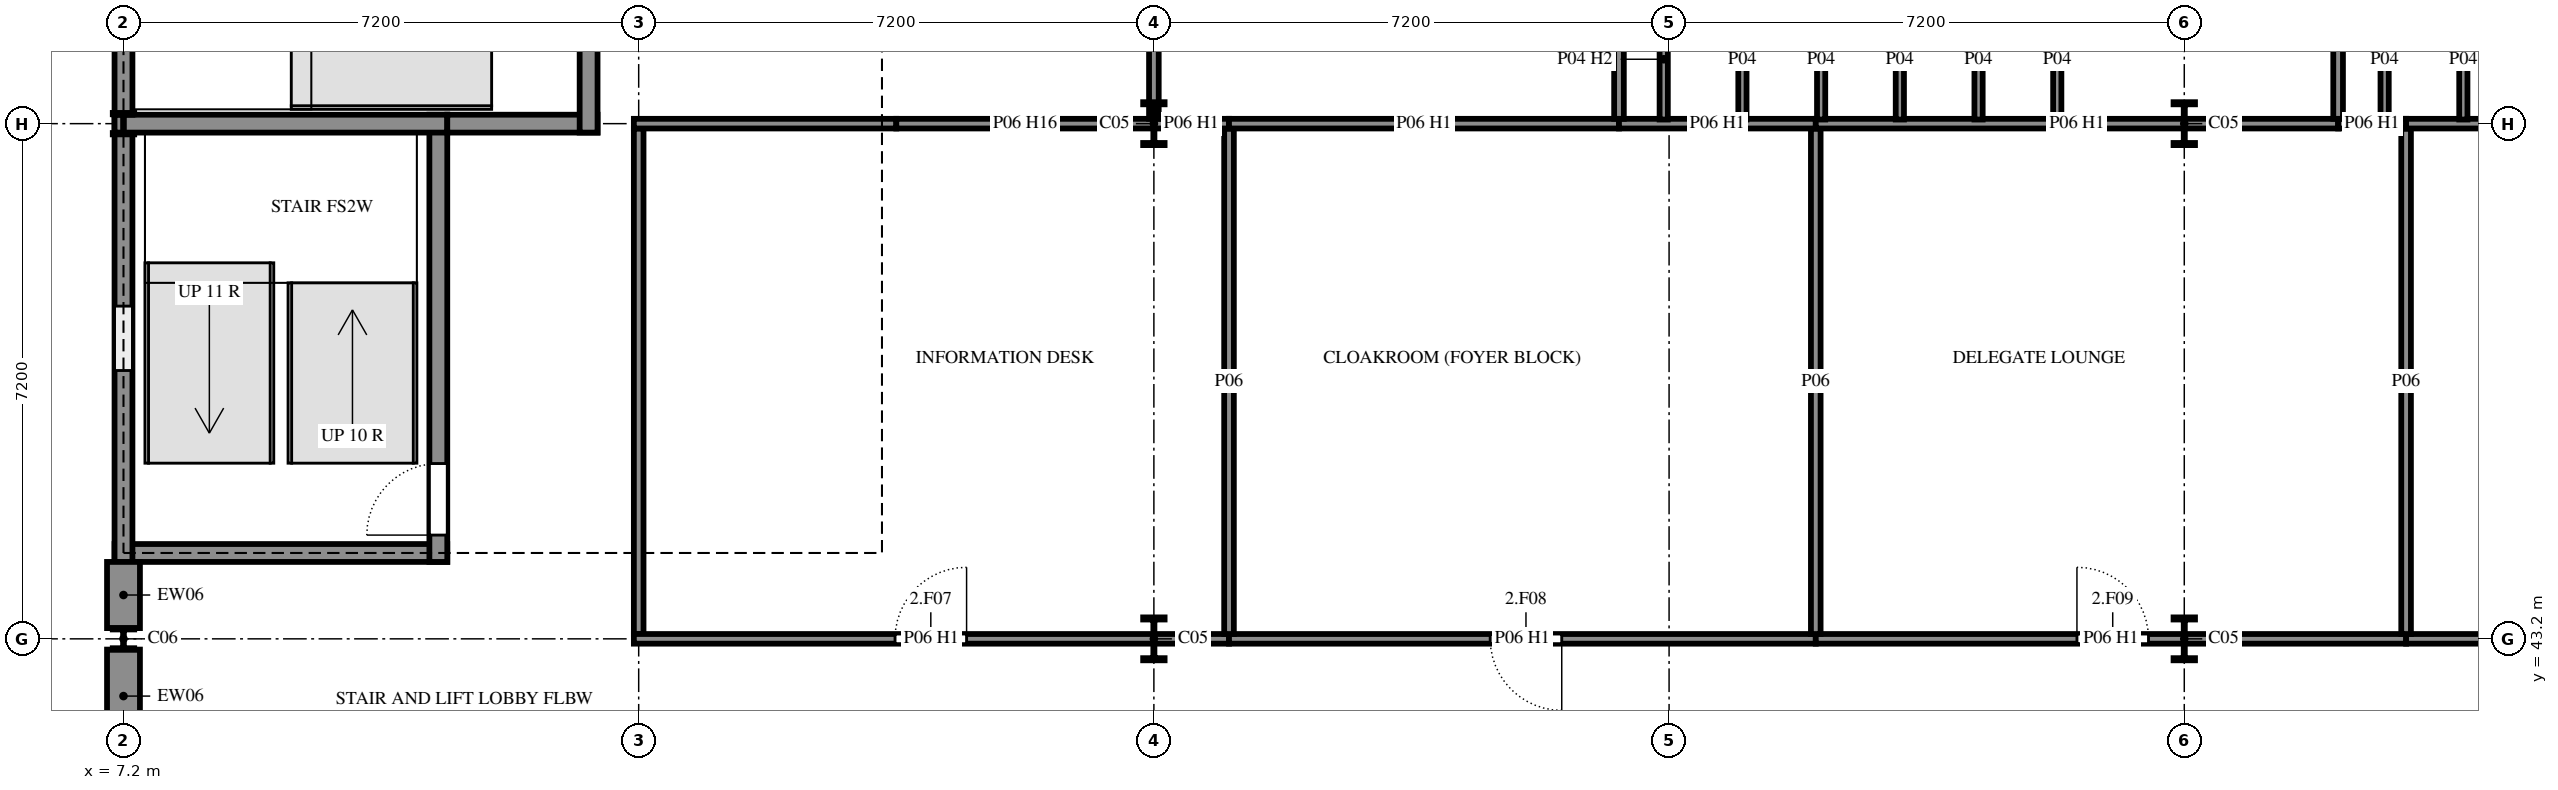
"""IFC4 building model, lengths in metres.
Left out: names, types, materials, properties, quantities, classifications, styles, units other than length and angle.
Written with IfcOpenShell. Run it as: python <this file> out.ifc"""

import sys

from ifc_helpers import new_model, si_unit, direction, frame, frame_2d, origin, origin_2d, place, context, subcontext, project, spatial, rectangle, i_section, extrude, element, fill, save


model = new_model("IFC4")
c1 = context("Model", 3, precision=1e-05, world=origin(), true_north=direction((0.0, 1.0)))
c2 = subcontext(c1, "Body", "Model", "MODEL_VIEW")
j1 = project(units=[si_unit("LENGTHUNIT", "METRE"), si_unit("PLANEANGLEUNIT", "RADIAN")], contexts=[c1])
p1 = place(None, origin())
s1 = spatial("IfcSite", under=j1, at=p1, CompositionType="ELEMENT")
p2 = place(p1, origin())
s2 = spatial("IfcBuilding", under=s1, at=p2, CompositionType="ELEMENT")
p3 = place(p2, frame((0.0, 0.0, 7.2)))
s3 = spatial("IfcBuildingStorey", under=s2, at=p3, CompositionType="ELEMENT", Elevation=7.2)
for number, where, z_axis, x_axis in (
    (1, (7.2, 43.2, 0.0), (0.0, 0.0, 1.0), (1.0, 0.0, 0.0)),
    (2, (7.2, 50.4, 0.0), (0.0, 0.0, 1.0), (1.0, 0.0, 0.0)),
):
    element("IfcColumn", number, at=place(p3, frame(where, z_axis=z_axis, x_axis=x_axis)), inside=s3, PredefinedType="COLUMN", context=c2, shape_type="SweptSolid", body=[
        extrude(i_section(OverallWidth=0.3, OverallDepth=0.3, WebThickness=0.011, FlangeThickness=0.019, FilletRadius=0.027, at=origin_2d()), origin(), (0.0, 0.0, 1.0), 3.6),
    ])
for number, where, z_axis, x_axis in (
    (3, (21.6, 43.2, 0.0), (0.0, 0.0, 1.0), (1.0, 0.0, 0.0)),
    (4, (21.6, 50.4, 0.0), (0.0, 0.0, 1.0), (1.0, 0.0, 0.0)),
    (5, (36.0, 43.2, 0.0), (0.0, 0.0, 1.0), (1.0, 0.0, 0.0)),
    (6, (36.0, 50.4, 0.0), (0.0, 0.0, 1.0), (1.0, 0.0, 0.0)),
):
    element("IfcColumn", number, at=place(p3, frame(where, z_axis=z_axis, x_axis=x_axis)), inside=s3, PredefinedType="COLUMN", context=c2, shape_type="SweptSolid", body=[
        extrude(i_section(OverallWidth=0.3, OverallDepth=0.6, WebThickness=0.015, FlangeThickness=0.03, FilletRadius=0.027, at=origin_2d()), origin(), (0.0, 0.0, 1.0), 3.6),
    ])
p4 = place(p3, frame((7.075, 44.4, 0.0), z_axis=(0.0, 0.0, 1.0), x_axis=(1.0, 0.0, 0.0)))
e7 = element("IfcWall", 7, at=p4, inside=s3, PredefinedType="SHEAR", context=c2, shape_type="SweptSolid", body=[
    extrude(rectangle(XDim=4.65, YDim=0.25, at=frame_2d((2.325, 0.0))), origin(), (0.0, 0.0, 1.0), 3.6),
])
p5 = place(p3, frame((11.6, 44.275, 0.0), z_axis=(0.0, 0.0, 1.0), x_axis=(0.0, 1.0, 0.0)))
e8 = element("IfcWall", 8, at=p5, inside=s3, PredefinedType="SHEAR", context=c2, shape_type="SweptSolid", body=[
    extrude(rectangle(XDim=6.25, YDim=0.25, at=frame_2d((3.125, 0.0))), origin(), (0.0, 0.0, 1.0), 3.6),
])
p6 = place(p5, frame((0.375, 0.0, 0.0)))
e9 = element("IfcOpeningElement", 9, at=p6, cuts=e8, PredefinedType="OPENING", context=c2, shape_type="SweptSolid", body=[
    extrude(rectangle(XDim=1.0, YDim=2.4, at=frame_2d((0.5, 1.2))), frame((0.0, 0.135, 0.0), z_axis=(0.0, -1.0, 0.0), x_axis=(1.0, 0.0, 0.0)), (0.0, 0.0, 1.0), 0.27),
])
p7 = place(p3, frame((7.2, 50.525, 0.0), z_axis=(0.0, 0.0, 1.0), x_axis=(0.0, -1.0, 0.0)))
e10 = element("IfcWall", 10, at=p7, inside=s3, PredefinedType="SHEAR", context=c2, shape_type="SweptSolid", body=[
    extrude(rectangle(XDim=6.25, YDim=0.25, at=frame_2d((3.125, 0.0))), origin(), (0.0, 0.0, 1.0), 3.6),
])
p8 = place(p7, frame((2.675, 0.0, 0.6)))
e11 = element("IfcOpeningElement", 11, at=p8, cuts=e10, PredefinedType="OPENING", context=c2, shape_type="SweptSolid", body=[
    extrude(rectangle(XDim=0.9, YDim=2.1, at=frame_2d((0.45, 1.05))), frame((0.0, 0.135, 0.0), z_axis=(0.0, -1.0, 0.0), x_axis=(1.0, 0.0, 0.0)), (0.0, 0.0, 1.0), 0.27),
])
p9 = place(p3, frame((11.725, 50.4, 0.0), z_axis=(0.0, 0.0, 1.0), x_axis=(-1.0, 0.0, 0.0)))
e12 = element("IfcWall", 12, at=p9, inside=s3, PredefinedType="SHEAR", context=c2, shape_type="SweptSolid", body=[
    extrude(rectangle(XDim=4.65, YDim=0.25, at=frame_2d((2.325, 0.0))), origin(), (0.0, 0.0, 1.0), 3.6),
])
p10 = place(p3, frame((11.725, 50.4, 0.0), z_axis=(0.0, 0.0, 1.0), x_axis=(1.0, 0.0, 0.0)))
e13 = element("IfcWall", 13, at=p10, inside=s3, PredefinedType="SHEAR", context=c2, shape_type="SweptSolid", body=[
    extrude(rectangle(XDim=2.1, YDim=0.25, at=frame_2d((1.05, 0.0))), origin(), (0.0, 0.0, 1.0), 3.6),
])
p11 = place(p3, frame((13.7, 50.275, 0.0), z_axis=(0.0, 0.0, 1.0), x_axis=(0.0, 1.0, 0.0)))
e14 = element("IfcWall", 14, at=p11, inside=s3, PredefinedType="SHEAR", context=c2, shape_type="SweptSolid", body=[
    extrude(rectangle(XDim=5.25, YDim=0.25, at=frame_2d((2.625, 0.0))), origin(), (0.0, 0.0, 1.0), 3.6),
])
p12 = place(p11, frame((1.975, 0.0, 0.0)))
e15 = element("IfcOpeningElement", 15, at=p12, cuts=e14, PredefinedType="OPENING", context=c2, shape_type="SweptSolid", body=[
    extrude(rectangle(XDim=1.2, YDim=2.4, at=frame_2d((0.6, 1.2))), frame((0.0, 0.135, 0.0), z_axis=(0.0, -1.0, 0.0), x_axis=(1.0, 0.0, 0.0)), (0.0, 0.0, 1.0), 0.27),
])
p13 = place(p3, frame((7.2, 55.525, 0.0), z_axis=(0.0, 0.0, 1.0), x_axis=(0.0, -1.0, 0.0)))
e16 = element("IfcWall", 16, at=p13, inside=s3, PredefinedType="SHEAR", context=c2, shape_type="SweptSolid", body=[
    extrude(rectangle(XDim=5.0, YDim=0.25, at=frame_2d((2.5, 0.0))), origin(), (0.0, 0.0, 1.0), 3.6),
])
p14 = place(p13, frame((2.175, 0.0, 0.6)))
e17 = element("IfcOpeningElement", 17, at=p14, cuts=e16, PredefinedType="OPENING", context=c2, shape_type="SweptSolid", body=[
    extrude(rectangle(XDim=0.9, YDim=2.1, at=frame_2d((0.45, 1.05))), frame((0.0, 0.135, 0.0), z_axis=(0.0, -1.0, 0.0), x_axis=(1.0, 0.0, 0.0)), (0.0, 0.0, 1.0), 0.27),
])
p15 = place(p3, frame((7.2, 44.275, 0.0), z_axis=(0.0, 0.0, 1.0), x_axis=(0.0, -1.0, 0.0)))
e18 = element("IfcWall", 18, at=p15, inside=s3, PredefinedType="SOLIDWALL", context=c2, shape_type="SweptSolid", body=[
    extrude(rectangle(XDim=0.925, YDim=0.46, at=frame_2d((0.462, 0.0))), origin(), (0.0, 0.0, 1.0), 3.22),
])
p16 = place(p3, frame((7.2, 43.05, 0.0), z_axis=(0.0, 0.0, 1.0), x_axis=(0.0, -1.0, 0.0)))
e19 = element("IfcWall", 19, at=p16, inside=s3, PredefinedType="SOLIDWALL", context=c2, shape_type="SweptSolid", body=[
    extrude(rectangle(XDim=1.3, YDim=0.46, at=frame_2d((0.65, 0.0))), origin(), (0.0, 0.0, 1.0), 3.22),
])
p17 = place(p3, frame((14.4, 50.333, 0.0), z_axis=(0.0, 0.0, 1.0), x_axis=(0.0, -1.0, 0.0)))
e20 = element("IfcWall", 20, at=p17, inside=s3, PredefinedType="PARTITIONING", context=c2, shape_type="SweptSolid", body=[
    extrude(rectangle(XDim=7.065, YDim=0.135, at=frame_2d((3.532, 0.0))), origin(), (0.0, 0.0, 1.0), 3.12),
])
p18 = place(p3, frame((18.0, 50.4, 0.0), z_axis=(0.0, 0.0, 1.0), x_axis=(-1.0, 0.0, 0.0)))
e21 = element("IfcWall", 21, at=p18, inside=s3, PredefinedType="PARTITIONING", context=c2, shape_type="SweptSolid", body=[
    extrude(rectangle(XDim=3.667, YDim=0.135, at=frame_2d((1.834, 0.0))), origin(), (0.0, 0.0, 1.0), 3.09),
])
p19 = place(p3, frame((14.333, 43.2, 0.0), z_axis=(0.0, 0.0, 1.0), x_axis=(1.0, 0.0, 0.0)))
e22 = element("IfcWall", 22, at=p19, inside=s3, PredefinedType="PARTITIONING", context=c2, shape_type="SweptSolid", body=[
    extrude(rectangle(XDim=8.317, YDim=0.135, at=frame_2d((4.159, 0.0))), origin(), (0.0, 0.0, 1.0), 2.82),
])
p20 = place(p19, frame((3.65, 0.0, 0.0)))
e23 = element("IfcOpeningElement", 23, at=p20, cuts=e22, PredefinedType="OPENING", context=c2, shape_type="SweptSolid", body=[
    extrude(rectangle(XDim=1.0, YDim=2.4, at=frame_2d((0.5, 1.2))), frame((0.0, 0.077, 0.0), z_axis=(0.0, -1.0, 0.0), x_axis=(1.0, 0.0, 0.0)), (0.0, 0.0, 1.0), 0.155),
])
p21 = place(p3, frame((22.65, 43.2, 0.0), z_axis=(0.0, 0.0, 1.0), x_axis=(1.0, 0.0, 0.0)))
e24 = element("IfcWall", 24, at=p21, inside=s3, PredefinedType="PARTITIONING", context=c2, shape_type="SweptSolid", body=[
    extrude(rectangle(XDim=8.2, YDim=0.135, at=frame_2d((4.1, 0.0))), origin(), (0.0, 0.0, 1.0), 2.82),
])
p22 = place(p21, frame((3.65, 0.0, 0.0)))
e25 = element("IfcOpeningElement", 25, at=p22, cuts=e24, PredefinedType="OPENING", context=c2, shape_type="SweptSolid", body=[
    extrude(rectangle(XDim=1.0, YDim=2.4, at=frame_2d((0.5, 1.2))), frame((0.0, 0.077, 0.0), z_axis=(0.0, -1.0, 0.0), x_axis=(1.0, 0.0, 0.0)), (0.0, 0.0, 1.0), 0.155),
])
p23 = place(p3, frame((30.85, 43.2, 0.0), z_axis=(0.0, 0.0, 1.0), x_axis=(1.0, 0.0, 0.0)))
e26 = element("IfcWall", 26, at=p23, inside=s3, PredefinedType="PARTITIONING", context=c2, shape_type="SweptSolid", body=[
    extrude(rectangle(XDim=8.25, YDim=0.135, at=frame_2d((4.125, 0.0))), origin(), (0.0, 0.0, 1.0), 2.82),
])
p24 = place(p23, frame((3.65, 0.0, 0.0)))
e27 = element("IfcOpeningElement", 27, at=p24, cuts=e26, PredefinedType="OPENING", context=c2, shape_type="SweptSolid", body=[
    extrude(rectangle(XDim=1.0, YDim=2.4, at=frame_2d((0.5, 1.2))), frame((0.0, 0.077, 0.0), z_axis=(0.0, -1.0, 0.0), x_axis=(1.0, 0.0, 0.0)), (0.0, 0.0, 1.0), 0.155),
])
p25 = place(p3, frame((39.1, 43.2, 0.0), z_axis=(0.0, 0.0, 1.0), x_axis=(1.0, 0.0, 0.0)))
e28 = element("IfcWall", 28, at=p25, inside=s3, PredefinedType="PARTITIONING", context=c2, shape_type="SweptSolid", body=[
    extrude(rectangle(XDim=8.2, YDim=0.135, at=frame_2d((4.1, 0.0))), origin(), (0.0, 0.0, 1.0), 2.82),
])
p26 = place(p25, frame((1.25, 0.0, 0.0)))
e29 = element("IfcOpeningElement", 29, at=p26, cuts=e28, PredefinedType="OPENING", context=c2, shape_type="SweptSolid", body=[
    extrude(rectangle(XDim=1.0, YDim=2.4, at=frame_2d((0.5, 1.2))), frame((0.0, 0.077, 0.0), z_axis=(0.0, -1.0, 0.0), x_axis=(1.0, 0.0, 0.0)), (0.0, 0.0, 1.0), 0.155),
])
p27 = place(p3, frame((22.65, 50.333, 0.0), z_axis=(0.0, 0.0, 1.0), x_axis=(0.0, -1.0, 0.0)))
e30 = element("IfcWall", 30, at=p27, inside=s3, PredefinedType="PARTITIONING", context=c2, shape_type="SweptSolid", body=[
    extrude(rectangle(XDim=7.065, YDim=0.135, at=frame_2d((3.532, 0.0))), origin(), (0.0, 0.0, 1.0), 3.42),
])
p28 = place(p3, frame((21.6, 50.4, 0.0), z_axis=(0.0, 0.0, 1.0), x_axis=(1.0, 0.0, 0.0)))
e31 = element("IfcWall", 31, at=p28, inside=s3, PredefinedType="PARTITIONING", context=c2, shape_type="SweptSolid", body=[
    extrude(rectangle(XDim=1.05, YDim=0.135, at=frame_2d((0.525, 0.0))), origin(), (0.0, 0.0, 1.0), 2.82),
])
p29 = place(p3, frame((18.0, 50.4, 0.0), z_axis=(0.0, 0.0, 1.0), x_axis=(1.0, 0.0, 0.0)))
e32 = element("IfcWall", 32, at=p29, inside=s3, PredefinedType="PARTITIONING", context=c2, shape_type="SweptSolid", body=[
    extrude(rectangle(XDim=3.6, YDim=0.135, at=frame_2d((1.8, 0.0))), origin(), (0.0, 0.0, 1.0), 3.09),
])
p30 = place(p3, frame((30.85, 50.333, 0.0), z_axis=(0.0, 0.0, 1.0), x_axis=(0.0, -1.0, 0.0)))
e33 = element("IfcWall", 33, at=p30, inside=s3, PredefinedType="PARTITIONING", context=c2, shape_type="SweptSolid", body=[
    extrude(rectangle(XDim=7.065, YDim=0.135, at=frame_2d((3.532, 0.0))), origin(), (0.0, 0.0, 1.0), 3.42),
])
p31 = place(p3, frame((22.65, 50.4, 0.0), z_axis=(0.0, 0.0, 1.0), x_axis=(1.0, 0.0, 0.0)))
e34 = element("IfcWall", 34, at=p31, inside=s3, PredefinedType="PARTITIONING", context=c2, shape_type="SweptSolid", body=[
    extrude(rectangle(XDim=5.45, YDim=0.135, at=frame_2d((2.725, 0.0))), origin(), (0.0, 0.0, 1.0), 2.82),
])
p32 = place(p3, frame((28.1, 50.4, 0.0), z_axis=(0.0, 0.0, 1.0), x_axis=(1.0, 0.0, 0.0)))
e35 = element("IfcWall", 35, at=p32, inside=s3, PredefinedType="PARTITIONING", context=c2, shape_type="SweptSolid", body=[
    extrude(rectangle(XDim=2.75, YDim=0.135, at=frame_2d((1.375, 0.0))), origin(), (0.0, 0.0, 1.0), 2.82),
])
p33 = place(p3, frame((39.1, 50.333, 0.0), z_axis=(0.0, 0.0, 1.0), x_axis=(0.0, -1.0, 0.0)))
e36 = element("IfcWall", 36, at=p33, inside=s3, PredefinedType="PARTITIONING", context=c2, shape_type="SweptSolid", body=[
    extrude(rectangle(XDim=7.065, YDim=0.135, at=frame_2d((3.532, 0.0))), origin(), (0.0, 0.0, 1.0), 3.42),
])
p34 = place(p3, frame((30.85, 50.4, 0.0), z_axis=(0.0, 0.0, 1.0), x_axis=(1.0, 0.0, 0.0)))
e37 = element("IfcWall", 37, at=p34, inside=s3, PredefinedType="PARTITIONING", context=c2, shape_type="SweptSolid", body=[
    extrude(rectangle(XDim=7.3, YDim=0.135, at=frame_2d((3.65, 0.0))), origin(), (0.0, 0.0, 1.0), 2.82),
])
p35 = place(p3, frame((38.15, 50.4, 0.0), z_axis=(0.0, 0.0, 1.0), x_axis=(1.0, 0.0, 0.0)))
e38 = element("IfcWall", 38, at=p35, inside=s3, PredefinedType="PARTITIONING", context=c2, shape_type="SweptSolid", body=[
    extrude(rectangle(XDim=0.95, YDim=0.135, at=frame_2d((0.475, 0.0))), origin(), (0.0, 0.0, 1.0), 2.82),
])
p36 = place(p3, frame((39.1, 50.4, 0.0), z_axis=(0.0, 0.0, 1.0), x_axis=(1.0, 0.0, 0.0)))
e39 = element("IfcWall", 39, at=p36, inside=s3, PredefinedType="PARTITIONING", context=c2, shape_type="SweptSolid", body=[
    extrude(rectangle(XDim=8.2, YDim=0.135, at=frame_2d((4.1, 0.0))), origin(), (0.0, 0.0, 1.0), 2.82),
])
p37 = place(p3, frame((28.1, 58.133, 0.0), z_axis=(0.0, 0.0, 1.0), x_axis=(0.0, -1.0, 0.0)))
e40 = element("IfcWall", 40, at=p37, inside=s3, PredefinedType="PARTITIONING", context=c2, shape_type="SweptSolid", body=[
    extrude(rectangle(XDim=7.665, YDim=0.135, at=frame_2d((3.833, 0.0))), origin(), (0.0, 0.0, 1.0), 3.42),
])
p38 = place(p3, frame((21.6, 50.468, 0.0), z_axis=(0.0, 0.0, 1.0), x_axis=(0.0, 1.0, 0.0)))
e41 = element("IfcWall", 41, at=p38, inside=s3, PredefinedType="PARTITIONING", context=c2, shape_type="SweptSolid", body=[
    extrude(rectangle(XDim=7.665, YDim=0.135, at=frame_2d((3.833, 0.0))), origin(), (0.0, 0.0, 1.0), 2.42),
])
p39 = place(p38, frame((3.35, 0.0, 0.0)))
e42 = element("IfcOpeningElement", 42, at=p39, cuts=e41, PredefinedType="OPENING", context=c2, shape_type="SweptSolid", body=[
    extrude(rectangle(XDim=1.0, YDim=2.4, at=frame_2d((0.5, 1.2))), frame((0.0, 0.077, 0.0), z_axis=(0.0, -1.0, 0.0), x_axis=(1.0, 0.0, 0.0)), (0.0, 0.0, 1.0), 0.155),
])
p40 = place(p3, frame((38.15, 58.133, 0.0), z_axis=(0.0, 0.0, 1.0), x_axis=(0.0, -1.0, 0.0)))
e43 = element("IfcWall", 43, at=p40, inside=s3, PredefinedType="PARTITIONING", context=c2, shape_type="SweptSolid", body=[
    extrude(rectangle(XDim=7.665, YDim=0.135, at=frame_2d((3.833, 0.0))), origin(), (0.0, 0.0, 1.0), 3.42),
])
p41 = place(p3, frame((28.725, 50.458, 0.0), z_axis=(0.0, 0.0, 1.0), x_axis=(0.0, 1.0, 0.0)))
e44 = element("IfcWall", 44, at=p41, inside=s3, PredefinedType="PARTITIONING", context=c2, shape_type="SweptSolid", body=[
    extrude(rectangle(XDim=1.685, YDim=0.115, at=frame_2d((0.843, 0.0))), origin(), (0.0, 0.0, 1.0), 3.12),
])
for number, where, z_axis, x_axis in (
    (45, (29.825, 50.458, 0.0), (0.0, 0.0, 1.0), (0.0, 1.0, 0.0)),
    (46, (30.925, 50.458, 0.0), (0.0, 0.0, 1.0), (0.0, 1.0, 0.0)),
    (47, (32.025, 50.458, 0.0), (0.0, 0.0, 1.0), (0.0, 1.0, 0.0)),
    (48, (33.125, 50.458, 0.0), (0.0, 0.0, 1.0), (0.0, 1.0, 0.0)),
    (49, (34.225, 50.458, 0.0), (0.0, 0.0, 1.0), (0.0, 1.0, 0.0)),
    (50, (38.8, 50.458, 0.0), (0.0, 0.0, 1.0), (0.0, 1.0, 0.0)),
    (51, (39.9, 50.458, 0.0), (0.0, 0.0, 1.0), (0.0, 1.0, 0.0)),
):
    element("IfcWall", number, at=place(p3, frame(where, z_axis=z_axis, x_axis=x_axis)), inside=s3, PredefinedType="PARTITIONING", context=c2, shape_type="SweptSolid", body=[
        extrude(rectangle(XDim=1.685, YDim=0.115, at=frame_2d((0.843, 0.0))), origin(), (0.0, 0.0, 1.0), 3.42),
    ])
p42 = place(p8, origin())
e52 = element("IfcWindow", 52, at=p42, inside=s3, PartitioningType="SINGLE_PANEL", PredefinedType="WINDOW", context=c2, shape_type="SweptSolid", body=[
    extrude(rectangle(XDim=0.9, YDim=2.1, at=frame_2d((0.45, 1.05))), frame((0.0, 0.03, 0.0), z_axis=(0.0, -1.0, 0.0), x_axis=(1.0, 0.0, 0.0)), (0.0, 0.0, 1.0), 0.06),
])
fill(e11, e52)
p43 = place(p6, origin())
e53 = element("IfcDoor", 53, at=p43, inside=s3, OperationType="SINGLE_SWING_RIGHT", PredefinedType="DOOR", context=c2, shape_type="SweptSolid", body=[
    extrude(rectangle(XDim=1.0, YDim=2.4, at=frame_2d((0.5, 1.2))), frame((0.0, 0.025, 0.0), z_axis=(0.0, -1.0, 0.0), x_axis=(1.0, 0.0, 0.0)), (0.0, 0.0, 1.0), 0.05),
])
fill(e9, e53)
p44 = place(p20, origin())
e54 = element("IfcDoor", 54, at=p44, inside=s3, OperationType="SINGLE_SWING_LEFT", PredefinedType="DOOR", context=c2, shape_type="SweptSolid", body=[
    extrude(rectangle(XDim=1.0, YDim=2.4, at=frame_2d((0.5, 1.2))), frame((0.0, 0.025, 0.0), z_axis=(0.0, -1.0, 0.0), x_axis=(1.0, 0.0, 0.0)), (0.0, 0.0, 1.0), 0.05),
])
fill(e23, e54)
p45 = place(p22, frame((1.0, 0.0, 0.0), z_axis=(0.0, 0.0, 1.0), x_axis=(-1.0, 0.0, 0.0)))
e55 = element("IfcDoor", 55, at=p45, inside=s3, OperationType="SINGLE_SWING_RIGHT", PredefinedType="DOOR", context=c2, shape_type="SweptSolid", body=[
    extrude(rectangle(XDim=1.0, YDim=2.4, at=frame_2d((0.5, 1.2))), frame((0.0, 0.025, 0.0), z_axis=(0.0, -1.0, 0.0), x_axis=(1.0, 0.0, 0.0)), (0.0, 0.0, 1.0), 0.05),
])
fill(e25, e55)
p46 = place(p24, origin())
e56 = element("IfcDoor", 56, at=p46, inside=s3, OperationType="SINGLE_SWING_RIGHT", PredefinedType="DOOR", context=c2, shape_type="SweptSolid", body=[
    extrude(rectangle(XDim=1.0, YDim=2.4, at=frame_2d((0.5, 1.2))), frame((0.0, 0.025, 0.0), z_axis=(0.0, -1.0, 0.0), x_axis=(1.0, 0.0, 0.0)), (0.0, 0.0, 1.0), 0.05),
])
fill(e27, e56)
save(model, sys.argv[1])
